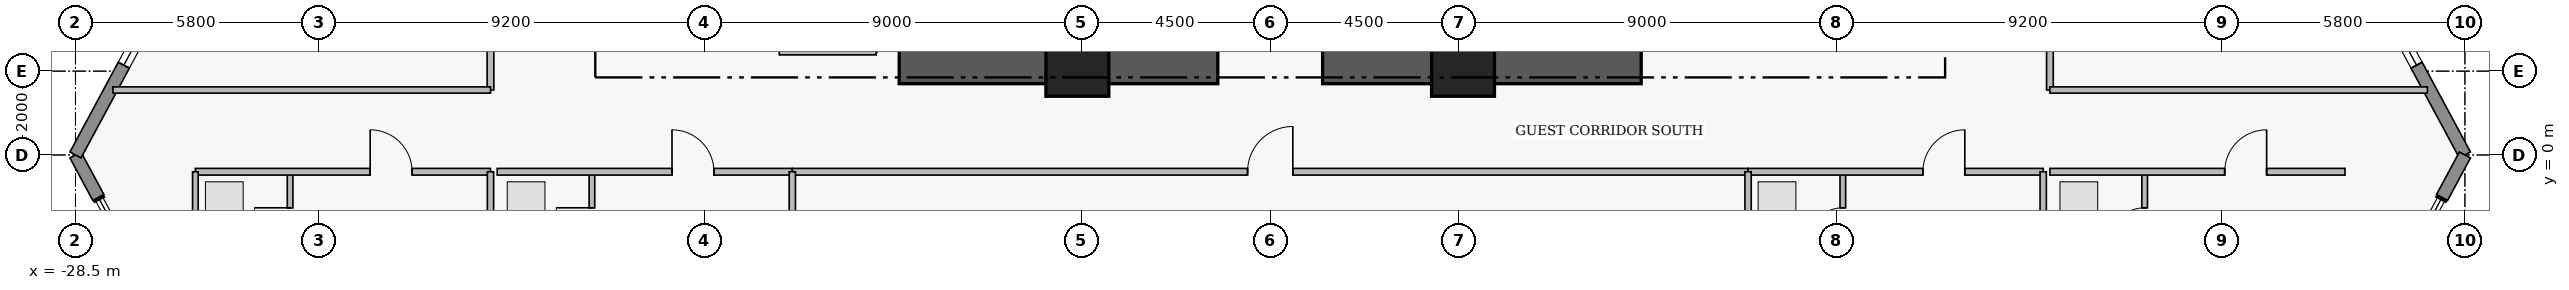
"""IFC4 building model, lengths in metres.
Left out: names, types, materials, properties, quantities, classifications, styles, units other than length and angle.
Written with IfcOpenShell. Run it as: python <this file> out.ifc"""

import sys

from ifc_helpers import new_model, si_unit, direction, frame, frame_2d, origin, origin_2d, place, context, subcontext, project, spatial, rectangle, extrude, element, fill, save


model = new_model("IFC4")
c1 = context("Model", 3, precision=1e-05, world=origin(), true_north=direction((0.0, 1.0)))
c2 = subcontext(c1, "Body", "Model", "MODEL_VIEW")
j1 = project(units=[si_unit("LENGTHUNIT", "METRE"), si_unit("PLANEANGLEUNIT", "RADIAN")], contexts=[c1])
p1 = place(None, origin())
s1 = spatial("IfcSite", under=j1, at=p1, CompositionType="ELEMENT")
p2 = place(p1, origin())
s2 = spatial("IfcBuilding", under=s1, at=p2, CompositionType="ELEMENT")
p3 = place(p2, frame((0.0, 0.0, 71.4)))
s3 = spatial("IfcBuildingStorey", under=s2, at=p3, CompositionType="ELEMENT", Elevation=71.4)
for number, where, z_axis, x_axis in (
    (1, (-8.85, 2.15, 0.0), (0.0, 0.0, 1.0), (1.0, 0.0, 0.0)),
    (2, (1.25, 2.15, 0.0), (0.0, 0.0, 1.0), (1.0, 0.0, 0.0)),
):
    element("IfcWall", number, at=place(p3, frame(where, z_axis=z_axis, x_axis=x_axis)), inside=s3, PredefinedType="SHEAR", context=c2, shape_type="SweptSolid", body=[
        extrude(rectangle(XDim=7.6, YDim=0.9, at=frame_2d((3.8, 0.0))), origin(), (0.0, 0.0, 1.0), 3.43),
    ])
for number, where, z_axis, x_axis in (
    (3, (-4.6, 2.15, 0.0), (0.0, 0.0, 1.0), (1.0, 0.0, 0.0)),
    (4, (4.6, 2.15, 0.0), (0.0, 0.0, 1.0), (1.0, 0.0, 0.0)),
):
    element("IfcColumn", number, at=place(p3, frame(where, z_axis=z_axis, x_axis=x_axis)), inside=s3, PredefinedType="COLUMN", context=c2, shape_type="SweptSolid", body=[
        extrude(rectangle(XDim=1.5, YDim=1.5, at=origin_2d()), origin(), (0.0, 0.0, 1.0), 3.65),
    ])
p4 = place(p3, frame((-27.955, -1.012, 0.0), z_axis=(0.0, 0.0, 1.0), x_axis=(-0.474099823035, 0.880471099922, 0.0)))
e5 = element("IfcWall", 5, at=p4, inside=s3, PredefinedType="STANDARD", context=c2, shape_type="SweptSolid", body=[
    extrude(rectangle(XDim=1.15, YDim=0.3, at=frame_2d((0.575, 0.0))), origin(), (0.0, 0.0, 1.0), 3.43),
])
p5 = place(p3, frame((-28.5, 0.0, 0.0), z_axis=(0.0, 0.0, 1.0), x_axis=(0.474109683532, 0.880465790352, 0.0)))
e6 = element("IfcWall", 6, at=p5, inside=s3, PredefinedType="STANDARD", context=c2, shape_type="SweptSolid", body=[
    extrude(rectangle(XDim=5.906, YDim=0.3, at=frame_2d((2.953, 0.0))), origin(), (0.0, 0.0, 1.0), 3.43),
])
p6 = place(p5, frame((2.432, 0.0, 0.95)))
e7 = element("IfcOpeningElement", 7, at=p6, cuts=e6, PredefinedType="OPENING", context=c2, shape_type="SweptSolid", body=[
    extrude(rectangle(XDim=1.15, YDim=1.55, at=frame_2d((0.575, 0.775))), frame((0.0, 0.16, 0.0), z_axis=(0.0, -1.0, 0.0), x_axis=(1.0, 0.0, 0.0)), (0.0, 0.0, 1.0), 0.32),
])
p7 = place(p3, frame((25.7, 5.2, 0.0), z_axis=(0.0, 0.0, 1.0), x_axis=(0.474109683532, -0.880465790352, 0.0)))
e8 = element("IfcWall", 8, at=p7, inside=s3, PredefinedType="STANDARD", context=c2, shape_type="SweptSolid", body=[
    extrude(rectangle(XDim=5.906, YDim=0.3, at=frame_2d((2.953, 0.0))), origin(), (0.0, 0.0, 1.0), 3.43),
])
p8 = place(p7, frame((2.324, 0.0, 0.95)))
e9 = element("IfcOpeningElement", 9, at=p8, cuts=e8, PredefinedType="OPENING", context=c2, shape_type="SweptSolid", body=[
    extrude(rectangle(XDim=1.15, YDim=1.55, at=frame_2d((0.575, 0.775))), frame((0.0, 0.16, 0.0), z_axis=(0.0, -1.0, 0.0), x_axis=(1.0, 0.0, 0.0)), (0.0, 0.0, 1.0), 0.32),
])
p9 = place(p3, frame((28.5, 0.0, 0.0), z_axis=(0.0, 0.0, 1.0), x_axis=(-0.474099823035, -0.880471099922, 0.0)))
e10 = element("IfcWall", 10, at=p9, inside=s3, PredefinedType="STANDARD", context=c2, shape_type="SweptSolid", body=[
    extrude(rectangle(XDim=1.15, YDim=0.3, at=frame_2d((0.575, 0.0))), origin(), (0.0, 0.0, 1.0), 3.43),
])
p10 = place(p3, frame((-23.38, -2.76, 0.0), z_axis=(0.0, 0.0, 1.0), x_axis=(0.0, 1.0, 0.0)))
e11 = element("IfcWall", 11, at=p10, inside=s3, PredefinedType="PLUMBINGWALL", context=c2, shape_type="SweptSolid", body=[
    extrude(rectangle(XDim=2.36, YDim=0.135, at=frame_2d((1.18, 0.0))), origin(), (0.0, 0.0, 1.0), 3.43),
])
p11 = place(p10, frame((0.65, 0.0, 0.0)))
e12 = element("IfcOpeningElement", 12, at=p11, cuts=e11, PredefinedType="OPENING", context=c2, shape_type="SweptSolid", body=[
    extrude(rectangle(XDim=0.85, YDim=2.1, at=frame_2d((0.425, 1.05))), frame((0.0, 0.077, 0.0), z_axis=(0.0, -1.0, 0.0), x_axis=(1.0, 0.0, 0.0)), (0.0, 0.0, 1.0), 0.155),
])
p12 = place(p3, frame((-25.64, -0.4, 0.0), z_axis=(0.0, 0.0, 1.0), x_axis=(1.0, 0.0, 0.0)))
e13 = element("IfcWall", 13, at=p12, inside=s3, PredefinedType="PARTITIONING", context=c2, shape_type="SweptSolid", body=[
    extrude(rectangle(XDim=7.04, YDim=0.16, at=frame_2d((3.52, 0.0))), origin(), (0.0, 0.0, 1.0), 3.43),
])
p13 = place(p12, frame((4.17, 0.0, 0.0)))
e14 = element("IfcOpeningElement", 14, at=p13, cuts=e13, PredefinedType="OPENING", context=c2, shape_type="SweptSolid", body=[
    extrude(rectangle(XDim=1.0, YDim=2.15, at=frame_2d((0.5, 1.075))), frame((0.0, 0.09, 0.0), z_axis=(0.0, -1.0, 0.0), x_axis=(1.0, 0.0, 0.0)), (0.0, 0.0, 1.0), 0.18),
])
p14 = place(p3, frame((-16.18, -2.76, 0.0), z_axis=(0.0, 0.0, 1.0), x_axis=(0.0, 1.0, 0.0)))
e15 = element("IfcWall", 15, at=p14, inside=s3, PredefinedType="PLUMBINGWALL", context=c2, shape_type="SweptSolid", body=[
    extrude(rectangle(XDim=2.36, YDim=0.135, at=frame_2d((1.18, 0.0))), origin(), (0.0, 0.0, 1.0), 3.43),
])
p15 = place(p14, frame((0.65, 0.0, 0.0)))
e16 = element("IfcOpeningElement", 16, at=p15, cuts=e15, PredefinedType="OPENING", context=c2, shape_type="SweptSolid", body=[
    extrude(rectangle(XDim=0.85, YDim=2.1, at=frame_2d((0.425, 1.05))), frame((0.0, 0.077, 0.0), z_axis=(0.0, -1.0, 0.0), x_axis=(1.0, 0.0, 0.0)), (0.0, 0.0, 1.0), 0.155),
])
p16 = place(p3, frame((-18.44, -0.4, 0.0), z_axis=(0.0, 0.0, 1.0), x_axis=(1.0, 0.0, 0.0)))
e17 = element("IfcWall", 17, at=p16, inside=s3, PredefinedType="PARTITIONING", context=c2, shape_type="SweptSolid", body=[
    extrude(rectangle(XDim=7.04, YDim=0.16, at=frame_2d((3.52, 0.0))), origin(), (0.0, 0.0, 1.0), 3.43),
])
p17 = place(p16, frame((4.17, 0.0, 0.0)))
e18 = element("IfcOpeningElement", 18, at=p17, cuts=e17, PredefinedType="OPENING", context=c2, shape_type="SweptSolid", body=[
    extrude(rectangle(XDim=1.0, YDim=2.15, at=frame_2d((0.5, 1.075))), frame((0.0, 0.09, 0.0), z_axis=(0.0, -1.0, 0.0), x_axis=(1.0, 0.0, 0.0)), (0.0, 0.0, 1.0), 0.18),
])
p18 = place(p3, frame((-11.4, -0.4, 0.0), z_axis=(0.0, 0.0, 1.0), x_axis=(1.0, 0.0, 0.0)))
e19 = element("IfcWall", 19, at=p18, inside=s3, PredefinedType="PARTITIONING", context=c2, shape_type="SweptSolid", body=[
    extrude(rectangle(XDim=22.8, YDim=0.16, at=frame_2d((11.4, 0.0))), origin(), (0.0, 0.0, 1.0), 3.43),
])
p19 = place(p18, frame((10.86, 0.0, 0.0)))
e20 = element("IfcOpeningElement", 20, at=p19, cuts=e19, PredefinedType="OPENING", context=c2, shape_type="SweptSolid", body=[
    extrude(rectangle(XDim=1.08, YDim=2.18, at=frame_2d((0.54, 1.09))), frame((0.0, 0.09, 0.0), z_axis=(0.0, -1.0, 0.0), x_axis=(1.0, 0.0, 0.0)), (0.0, 0.0, 1.0), 0.18),
])
p20 = place(p3, frame((13.66, -2.76, 0.0), z_axis=(0.0, 0.0, 1.0), x_axis=(0.0, 1.0, 0.0)))
e21 = element("IfcWall", 21, at=p20, inside=s3, PredefinedType="PLUMBINGWALL", context=c2, shape_type="SweptSolid", body=[
    extrude(rectangle(XDim=2.36, YDim=0.135, at=frame_2d((1.18, 0.0))), origin(), (0.0, 0.0, 1.0), 2.668),
])
p21 = place(p20, frame((0.65, 0.0, 0.0)))
e22 = element("IfcOpeningElement", 22, at=p21, cuts=e21, PredefinedType="OPENING", context=c2, shape_type="SweptSolid", body=[
    extrude(rectangle(XDim=0.85, YDim=2.1, at=frame_2d((0.425, 1.05))), frame((0.0, 0.077, 0.0), z_axis=(0.0, -1.0, 0.0), x_axis=(1.0, 0.0, 0.0)), (0.0, 0.0, 1.0), 0.155),
])
p22 = place(p3, frame((11.4, -0.4, 0.0), z_axis=(0.0, 0.0, 1.0), x_axis=(1.0, 0.0, 0.0)))
e23 = element("IfcWall", 23, at=p22, inside=s3, PredefinedType="PARTITIONING", context=c2, shape_type="SweptSolid", body=[
    extrude(rectangle(XDim=7.04, YDim=0.16, at=frame_2d((3.52, 0.0))), origin(), (0.0, 0.0, 1.0), 3.43),
])
p23 = place(p22, frame((4.17, 0.0, 0.0)))
e24 = element("IfcOpeningElement", 24, at=p23, cuts=e23, PredefinedType="OPENING", context=c2, shape_type="SweptSolid", body=[
    extrude(rectangle(XDim=1.0, YDim=2.15, at=frame_2d((0.5, 1.075))), frame((0.0, 0.09, 0.0), z_axis=(0.0, -1.0, 0.0), x_axis=(1.0, 0.0, 0.0)), (0.0, 0.0, 1.0), 0.18),
])
p24 = place(p3, frame((20.86, -2.76, 0.0), z_axis=(0.0, 0.0, 1.0), x_axis=(0.0, 1.0, 0.0)))
e25 = element("IfcWall", 25, at=p24, inside=s3, PredefinedType="PLUMBINGWALL", context=c2, shape_type="SweptSolid", body=[
    extrude(rectangle(XDim=2.36, YDim=0.135, at=frame_2d((1.18, 0.0))), origin(), (0.0, 0.0, 1.0), 3.43),
])
p25 = place(p24, frame((0.65, 0.0, 0.0)))
e26 = element("IfcOpeningElement", 26, at=p25, cuts=e25, PredefinedType="OPENING", context=c2, shape_type="SweptSolid", body=[
    extrude(rectangle(XDim=0.85, YDim=2.1, at=frame_2d((0.425, 1.05))), frame((0.0, 0.077, 0.0), z_axis=(0.0, -1.0, 0.0), x_axis=(1.0, 0.0, 0.0)), (0.0, 0.0, 1.0), 0.155),
])
p26 = place(p3, frame((18.6, -0.4, 0.0), z_axis=(0.0, 0.0, 1.0), x_axis=(1.0, 0.0, 0.0)))
e27 = element("IfcWall", 27, at=p26, inside=s3, PredefinedType="PARTITIONING", context=c2, shape_type="SweptSolid", body=[
    extrude(rectangle(XDim=7.04, YDim=0.16, at=frame_2d((3.52, 0.0))), origin(), (0.0, 0.0, 1.0), 3.43),
])
p27 = place(p26, frame((4.17, 0.0, 0.0)))
e28 = element("IfcOpeningElement", 28, at=p27, cuts=e27, PredefinedType="OPENING", context=c2, shape_type="SweptSolid", body=[
    extrude(rectangle(XDim=1.0, YDim=2.15, at=frame_2d((0.5, 1.075))), frame((0.0, 0.09, 0.0), z_axis=(0.0, -1.0, 0.0), x_axis=(1.0, 0.0, 0.0)), (0.0, 0.0, 1.0), 0.18),
])
p28 = place(p3, frame((18.6, 1.55, 0.0), z_axis=(0.0, 0.0, 1.0), x_axis=(0.0, 1.0, 0.0)))
e29 = element("IfcWall", 29, at=p28, inside=s3, PredefinedType="PARTITIONING", context=c2, shape_type="SweptSolid", body=[
    extrude(rectangle(XDim=5.2, YDim=0.16, at=frame_2d((2.6, 0.0))), origin(), (0.0, 0.0, 1.0), 3.43),
])
p29 = place(p28, frame((2.14, 0.0, 0.0)))
e30 = element("IfcOpeningElement", 30, at=p29, cuts=e29, PredefinedType="OPENING", context=c2, shape_type="SweptSolid", body=[
    extrude(rectangle(XDim=0.92, YDim=2.12, at=frame_2d((0.46, 1.06))), frame((0.0, 0.09, 0.0), z_axis=(0.0, -1.0, 0.0), x_axis=(1.0, 0.0, 0.0)), (0.0, 0.0, 1.0), 0.18),
])
p30 = place(p3, frame((-18.6, 1.55, 0.0), z_axis=(0.0, 0.0, 1.0), x_axis=(0.0, 1.0, 0.0)))
e31 = element("IfcWall", 31, at=p30, inside=s3, PredefinedType="PARTITIONING", context=c2, shape_type="SweptSolid", body=[
    extrude(rectangle(XDim=6.35, YDim=0.16, at=frame_2d((3.175, 0.0))), origin(), (0.0, 0.0, 1.0), 3.43),
])
p31 = place(p30, frame((2.7, 0.0, 0.0)))
e32 = element("IfcOpeningElement", 32, at=p31, cuts=e31, PredefinedType="OPENING", context=c2, shape_type="SweptSolid", body=[
    extrude(rectangle(XDim=0.95, YDim=2.15, at=frame_2d((0.475, 1.075))), frame((0.0, 0.09, 0.0), z_axis=(0.0, -1.0, 0.0), x_axis=(1.0, 0.0, 0.0)), (0.0, 0.0, 1.0), 0.18),
])
p32 = place(p3, frame((-11.71, 2.47, 0.0), z_axis=(0.0, 0.0, 1.0), x_axis=(1.0, 0.0, 0.0)))
e33 = element("IfcWall", 33, at=p32, inside=s3, PredefinedType="PARTITIONING", context=c2, shape_type="SweptSolid", body=[
    extrude(rectangle(XDim=2.31, YDim=0.165, at=frame_2d((1.155, 0.0))), origin(), (0.0, 0.0, 1.0), 2.03),
])
p33 = place(p3, frame((-25.64, -2.76, 0.0), z_axis=(0.0, 0.0, 1.0), x_axis=(0.0, 1.0, 0.0)))
e34 = element("IfcWall", 34, at=p33, inside=s3, PredefinedType="PLUMBINGWALL", context=c2, shape_type="SweptSolid", body=[
    extrude(rectangle(XDim=2.36, YDim=0.135, at=frame_2d((1.18, 0.0))), origin(), (0.0, 0.0, 1.0), 3.43),
])
for number, where, z_axis, x_axis in (
    (35, (-18.6, -23.02, 0.0), (0.0, 0.0, 1.0), (0.0, 1.0, 0.0)),
    (36, (-11.4, -23.02, 0.0), (0.0, 0.0, 1.0), (0.0, 1.0, 0.0)),
):
    element("IfcWall", number, at=place(p3, frame(where, z_axis=z_axis, x_axis=x_axis)), inside=s3, PredefinedType="PARTITIONING", context=c2, shape_type="SweptSolid", body=[
        extrude(rectangle(XDim=22.62, YDim=0.15, at=frame_2d((11.31, 0.0))), origin(), (0.0, 0.0, 1.0), 3.43),
    ])
p34 = place(p3, frame((11.4, -23.04, 0.0), z_axis=(0.0, 0.0, 1.0), x_axis=(0.0, 1.0, 0.0)))
e37 = element("IfcWall", 37, at=p34, inside=s3, PredefinedType="PARTITIONING", context=c2, shape_type="SweptSolid", body=[
    extrude(rectangle(XDim=22.64, YDim=0.15, at=frame_2d((11.32, 0.0))), origin(), (0.0, 0.0, 1.0), 3.43),
])
p35 = place(p3, frame((18.44, -23.02, 0.0), z_axis=(0.0, 0.0, 1.0), x_axis=(0.0, 1.0, 0.0)))
e38 = element("IfcWall", 38, at=p35, inside=s3, PredefinedType="PARTITIONING", context=c2, shape_type="SweptSolid", body=[
    extrude(rectangle(XDim=22.62, YDim=0.15, at=frame_2d((11.31, 0.0))), origin(), (0.0, 0.0, 1.0), 3.43),
])
for number, where, z_axis, x_axis in (
    (39, (18.6, 1.55, 0.0), (0.0, 0.0, 1.0), (1.0, 0.0, 0.0)),
    (40, (-27.605, 1.55, 0.0), (0.0, 0.0, 1.0), (1.0, 0.0, 0.0)),
):
    element("IfcWall", number, at=place(p3, frame(where, z_axis=z_axis, x_axis=x_axis)), inside=s3, PredefinedType="PARTITIONING", context=c2, shape_type="SweptSolid", body=[
        extrude(rectangle(XDim=9.005, YDim=0.15, at=frame_2d((4.503, 0.0))), origin(), (0.0, 0.0, 1.0), 3.43),
    ])
p36 = place(p6, origin())
e41 = element("IfcWindow", 41, at=p36, inside=s3, PartitioningType="SINGLE_PANEL", PredefinedType="WINDOW", context=c2, shape_type="SweptSolid", body=[
    extrude(rectangle(XDim=1.15, YDim=1.55, at=frame_2d((0.575, 0.775))), frame((0.0, 0.03, 0.0), z_axis=(0.0, -1.0, 0.0), x_axis=(1.0, 0.0, 0.0)), (0.0, 0.0, 1.0), 0.06),
])
fill(e7, e41)
p37 = place(p8, origin())
e42 = element("IfcWindow", 42, at=p37, inside=s3, PartitioningType="SINGLE_PANEL", PredefinedType="WINDOW", context=c2, shape_type="SweptSolid", body=[
    extrude(rectangle(XDim=1.15, YDim=1.55, at=frame_2d((0.575, 0.775))), frame((0.0, 0.03, 0.0), z_axis=(0.0, -1.0, 0.0), x_axis=(1.0, 0.0, 0.0)), (0.0, 0.0, 1.0), 0.06),
])
fill(e9, e42)
p38 = place(p11, origin())
e43 = element("IfcDoor", 43, at=p38, inside=s3, OperationType="SINGLE_SWING_RIGHT", PredefinedType="DOOR", context=c2, shape_type="SweptSolid", body=[
    extrude(rectangle(XDim=0.85, YDim=2.1, at=frame_2d((0.425, 1.05))), frame((0.0, 0.025, 0.0), z_axis=(0.0, -1.0, 0.0), x_axis=(1.0, 0.0, 0.0)), (0.0, 0.0, 1.0), 0.05),
])
fill(e12, e43)
p39 = place(p13, origin())
e44 = element("IfcDoor", 44, at=p39, inside=s3, OperationType="SINGLE_SWING_LEFT", PredefinedType="DOOR", context=c2, shape_type="SweptSolid", body=[
    extrude(rectangle(XDim=1.0, YDim=2.15, at=frame_2d((0.5, 1.075))), frame((0.0, 0.025, 0.0), z_axis=(0.0, -1.0, 0.0), x_axis=(1.0, 0.0, 0.0)), (0.0, 0.0, 1.0), 0.05),
])
fill(e14, e44)
p40 = place(p15, origin())
e45 = element("IfcDoor", 45, at=p40, inside=s3, OperationType="SINGLE_SWING_RIGHT", PredefinedType="DOOR", context=c2, shape_type="SweptSolid", body=[
    extrude(rectangle(XDim=0.85, YDim=2.1, at=frame_2d((0.425, 1.05))), frame((0.0, 0.025, 0.0), z_axis=(0.0, -1.0, 0.0), x_axis=(1.0, 0.0, 0.0)), (0.0, 0.0, 1.0), 0.05),
])
fill(e16, e45)
p41 = place(p17, origin())
e46 = element("IfcDoor", 46, at=p41, inside=s3, OperationType="SINGLE_SWING_LEFT", PredefinedType="DOOR", context=c2, shape_type="SweptSolid", body=[
    extrude(rectangle(XDim=1.0, YDim=2.15, at=frame_2d((0.5, 1.075))), frame((0.0, 0.025, 0.0), z_axis=(0.0, -1.0, 0.0), x_axis=(1.0, 0.0, 0.0)), (0.0, 0.0, 1.0), 0.05),
])
fill(e18, e46)
p42 = place(p19, origin())
e47 = element("IfcDoor", 47, at=p42, inside=s3, OperationType="SINGLE_SWING_RIGHT", PredefinedType="DOOR", context=c2, shape_type="SweptSolid", body=[
    extrude(rectangle(XDim=1.08, YDim=2.18, at=frame_2d((0.54, 1.09))), frame((0.0, 0.025, 0.0), z_axis=(0.0, -1.0, 0.0), x_axis=(1.0, 0.0, 0.0)), (0.0, 0.0, 1.0), 0.05),
])
fill(e20, e47)
p43 = place(p21, origin())
e48 = element("IfcDoor", 48, at=p43, inside=s3, OperationType="SINGLE_SWING_LEFT", PredefinedType="DOOR", context=c2, shape_type="SweptSolid", body=[
    extrude(rectangle(XDim=0.85, YDim=2.1, at=frame_2d((0.425, 1.05))), frame((0.0, 0.025, 0.0), z_axis=(0.0, -1.0, 0.0), x_axis=(1.0, 0.0, 0.0)), (0.0, 0.0, 1.0), 0.05),
])
fill(e22, e48)
p44 = place(p23, origin())
e49 = element("IfcDoor", 49, at=p44, inside=s3, OperationType="SINGLE_SWING_RIGHT", PredefinedType="DOOR", context=c2, shape_type="SweptSolid", body=[
    extrude(rectangle(XDim=1.0, YDim=2.15, at=frame_2d((0.5, 1.075))), frame((0.0, 0.025, 0.0), z_axis=(0.0, -1.0, 0.0), x_axis=(1.0, 0.0, 0.0)), (0.0, 0.0, 1.0), 0.05),
])
fill(e24, e49)
p45 = place(p25, origin())
e50 = element("IfcDoor", 50, at=p45, inside=s3, OperationType="SINGLE_SWING_LEFT", PredefinedType="DOOR", context=c2, shape_type="SweptSolid", body=[
    extrude(rectangle(XDim=0.85, YDim=2.1, at=frame_2d((0.425, 1.05))), frame((0.0, 0.025, 0.0), z_axis=(0.0, -1.0, 0.0), x_axis=(1.0, 0.0, 0.0)), (0.0, 0.0, 1.0), 0.05),
])
fill(e26, e50)
p46 = place(p27, origin())
e51 = element("IfcDoor", 51, at=p46, inside=s3, OperationType="SINGLE_SWING_RIGHT", PredefinedType="DOOR", context=c2, shape_type="SweptSolid", body=[
    extrude(rectangle(XDim=1.0, YDim=2.15, at=frame_2d((0.5, 1.075))), frame((0.0, 0.025, 0.0), z_axis=(0.0, -1.0, 0.0), x_axis=(1.0, 0.0, 0.0)), (0.0, 0.0, 1.0), 0.05),
])
fill(e28, e51)
save(model, sys.argv[1])
